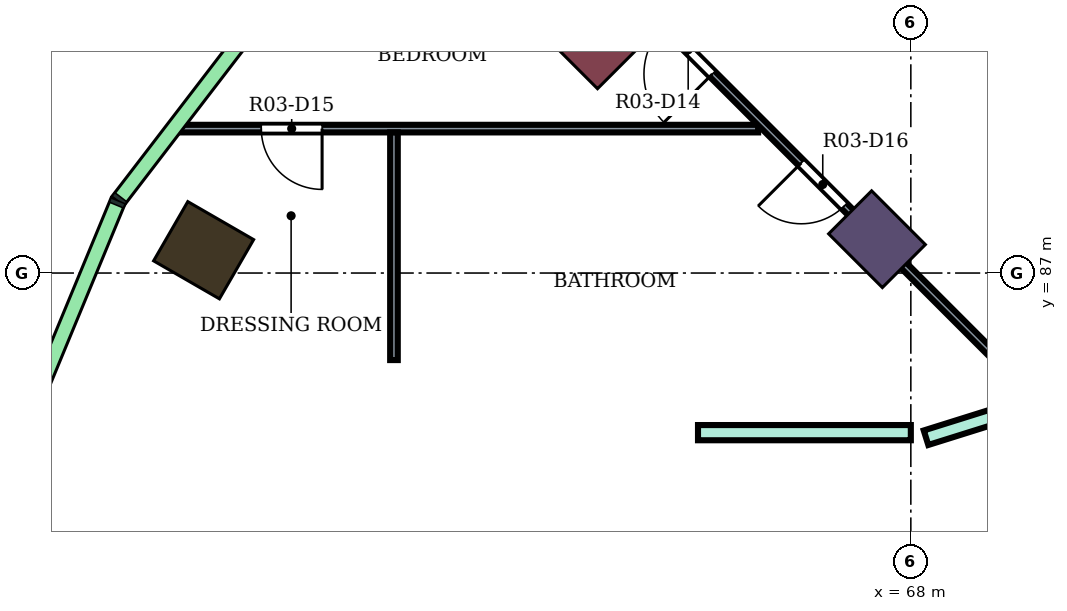
"""IFC4 building model, lengths in metres.
Left out: names, types, materials, properties, quantities, classifications, styles, units other than length and angle.
Written with IfcOpenShell. Run it as: python <this file> out.ifc"""

import sys

from ifc_helpers import new_model, si_unit, direction, frame, frame_2d, origin, origin_2d, place, context, subcontext, project, spatial, rectangle, extrude, element, fill, save


model = new_model("IFC4")
c1 = context("Model", 3, precision=1e-05, world=origin(), true_north=direction((0.0, 1.0)))
c2 = subcontext(c1, "Body", "Model", "MODEL_VIEW")
j1 = project(units=[si_unit("LENGTHUNIT", "METRE"), si_unit("PLANEANGLEUNIT", "RADIAN")], contexts=[c1])
p1 = place(None, origin())
s1 = spatial("IfcSite", under=j1, at=p1, CompositionType="ELEMENT")
p2 = place(p1, origin())
s2 = spatial("IfcBuilding", under=s1, at=p2, CompositionType="ELEMENT")
p3 = place(p2, frame((0.0, 0.0, 182.3)))
s3 = spatial("IfcBuildingStorey", under=s2, at=p3, CompositionType="ELEMENT", Elevation=182.3)
p4 = place(p3, frame((58.696, 87.3, 0.0), z_axis=(0.0, 0.0, 1.0), x_axis=(-0.866025403784, 0.5, 0.0)))
e1 = element("IfcColumn", 1, at=p4, inside=s3, PredefinedType="COLUMN", context=c2, shape_type="SweptSolid", body=[
    extrude(rectangle(XDim=1.0, YDim=0.9, at=origin_2d()), origin(), (0.0, 0.0, 1.0), 4.1),
])
p5 = place(p3, frame((67.555, 87.445, 0.0), z_axis=(0.0, 0.0, 1.0), x_axis=(-0.707106781187, 0.707106781187, 0.0)))
e2 = element("IfcColumn", 2, at=p5, inside=s3, PredefinedType="COLUMN", context=c2, shape_type="SweptSolid", body=[
    extrude(rectangle(XDim=1.0, YDim=0.8, at=origin_2d()), origin(), (0.0, 0.0, 1.0), 4.1),
])
p6 = place(p3, frame((64.09, 90.91, 0.0), z_axis=(0.0, 0.0, 1.0), x_axis=(-0.707106781187, 0.707106781187, 0.0)))
e3 = element("IfcColumn", 3, at=p6, inside=s3, PredefinedType="COLUMN", context=c2, shape_type="SweptSolid", body=[
    extrude(rectangle(XDim=1.8, YDim=2.4, at=origin_2d()), origin(), (0.0, 0.0, 1.0), 4.1),
])
p7 = place(p3, frame((65.2, 84.9, 0.0), z_axis=(0.0, 0.0, 1.0), x_axis=(1.0, 0.0, 0.0)))
e4 = element("IfcWall", 4, at=p7, inside=s3, PredefinedType="PARTITIONING", context=c2, shape_type="SweptSolid", body=[
    extrude(rectangle(XDim=2.8, YDim=0.2, at=frame_2d((1.4, 0.0))), origin(), (0.0, 0.0, 1.0), 3.65),
])
p8 = place(p3, frame((67.102, 97.342, 0.0), z_axis=(0.0, 0.0, 1.0), x_axis=(0.499940938316, -0.866059500378, 0.0)))
e5 = element("IfcWall", 5, at=p8, inside=s3, PredefinedType="PARTITIONING", context=c2, shape_type="SweptSolid", body=[
    extrude(rectangle(XDim=12.446, YDim=0.2, at=frame_2d((6.223, 0.0))), origin(), (0.0, 0.0, 1.0), 3.65),
])
p9 = place(p3, frame((68.2, 84.833, 0.0), z_axis=(0.0, 0.0, 1.0), x_axis=(0.954204109499, 0.299156342762, 0.0)))
e6 = element("IfcWall", 6, at=p9, inside=s3, PredefinedType="PARTITIONING", context=c2, shape_type="SweptSolid", body=[
    extrude(rectangle(XDim=5.74, YDim=0.2, at=frame_2d((2.87, 0.0))), origin(), (0.0, 0.0, 1.0), 3.65),
])
p10 = place(p9, frame((3.903, 0.0, 0.0)))
e7 = element("IfcOpeningElement", 7, at=p10, cuts=e6, PredefinedType="OPENING", context=c2, shape_type="SweptSolid", body=[
    extrude(rectangle(XDim=1.0, YDim=2.1, at=frame_2d((0.5, 1.05))), frame((0.0, 0.11, 0.0), z_axis=(0.0, -1.0, 0.0), x_axis=(1.0, 0.0, 0.0)), (0.0, 0.0, 1.0), 0.22),
])
p11 = place(p3, frame((58.379, 88.9, 0.0), z_axis=(0.0, 0.0, 1.0), x_axis=(1.0, 0.0, 0.0)))
e8 = element("IfcWall", 8, at=p11, inside=s3, PredefinedType="PARTITIONING", context=c2, shape_type="SweptSolid", body=[
    extrude(rectangle(XDim=7.612, YDim=0.1, at=frame_2d((3.806, 0.0))), origin(), (0.0, 0.0, 1.0), 3.65),
])
p12 = place(p11, frame((1.075, 0.0, 0.0)))
e9 = element("IfcOpeningElement", 9, at=p12, cuts=e8, PredefinedType="OPENING", context=c2, shape_type="SweptSolid", body=[
    extrude(rectangle(XDim=0.8, YDim=2.1, at=frame_2d((0.4, 1.05))), frame((0.0, 0.06, 0.0), z_axis=(0.0, -1.0, 0.0), x_axis=(1.0, 0.0, 0.0)), (0.0, 0.0, 1.0), 0.12),
])
p13 = place(p3, frame((61.2, 85.855, 0.0), z_axis=(0.0, 0.0, 1.0), x_axis=(0.0, 1.0, 0.0)))
e10 = element("IfcWall", 10, at=p13, inside=s3, PredefinedType="PARTITIONING", context=c2, shape_type="SweptSolid", body=[
    extrude(rectangle(XDim=2.995, YDim=0.1, at=frame_2d((1.498, 0.0))), origin(), (0.0, 0.0, 1.0), 3.65),
])
p14 = place(p3, frame((63.599, 91.409, 0.0), z_axis=(0.0, 0.0, 1.0), x_axis=(0.706920044618, -0.707293468453, 0.0)))
e11 = element("IfcWall", 11, at=p14, inside=s3, PredefinedType="PARTITIONING", context=c2, shape_type="SweptSolid", body=[
    extrude(rectangle(XDim=8.499, YDim=0.1, at=frame_2d((4.25, 0.0))), origin(), (0.0, 0.0, 1.0), 3.65),
])
p15 = place(p14, frame((1.632, 0.0, 0.0)))
e12 = element("IfcOpeningElement", 12, at=p15, cuts=e11, PredefinedType="OPENING", context=c2, shape_type="SweptSolid", body=[
    extrude(rectangle(XDim=0.9, YDim=2.1, at=frame_2d((0.45, 1.05))), frame((0.0, 0.06, 0.0), z_axis=(0.0, -1.0, 0.0), x_axis=(1.0, 0.0, 0.0)), (0.0, 0.0, 1.0), 0.12),
])
p16 = place(p14, frame((4.186, 0.0, 0.0)))
e13 = element("IfcOpeningElement", 13, at=p16, cuts=e11, PredefinedType="OPENING", context=c2, shape_type="SweptSolid", body=[
    extrude(rectangle(XDim=0.8, YDim=2.1, at=frame_2d((0.4, 1.05))), frame((0.0, 0.06, 0.0), z_axis=(0.0, -1.0, 0.0), x_axis=(1.0, 0.0, 0.0)), (0.0, 0.0, 1.0), 0.12),
])
p17 = place(p15, frame((0.9, 0.0, 0.0), z_axis=(0.0, 0.0, 1.0), x_axis=(-1.0, 0.0, 0.0)))
e14 = element("IfcDoor", 14, at=p17, inside=s3, OperationType="SINGLE_SWING_LEFT", PredefinedType="DOOR", context=c2, shape_type="SweptSolid", body=[
    extrude(rectangle(XDim=0.9, YDim=2.1, at=frame_2d((0.45, 1.05))), frame((0.0, 0.025, 0.0), z_axis=(0.0, -1.0, 0.0), x_axis=(1.0, 0.0, 0.0)), (0.0, 0.0, 1.0), 0.05),
])
fill(e12, e14)
p18 = place(p12, frame((0.8, 0.0, 0.0), z_axis=(0.0, 0.0, 1.0), x_axis=(-1.0, 0.0, 0.0)))
e15 = element("IfcDoor", 15, at=p18, inside=s3, OperationType="SINGLE_SWING_LEFT", PredefinedType="DOOR", context=c2, shape_type="SweptSolid", body=[
    extrude(rectangle(XDim=0.8, YDim=2.1, at=frame_2d((0.4, 1.05))), frame((0.0, 0.025, 0.0), z_axis=(0.0, -1.0, 0.0), x_axis=(1.0, 0.0, 0.0)), (0.0, 0.0, 1.0), 0.05),
])
fill(e9, e15)
p19 = place(p16, frame((0.8, 0.0, 0.0), z_axis=(0.0, 0.0, 1.0), x_axis=(-1.0, 0.0, 0.0)))
e16 = element("IfcDoor", 16, at=p19, inside=s3, OperationType="SINGLE_SWING_RIGHT", PredefinedType="DOOR", context=c2, shape_type="SweptSolid", body=[
    extrude(rectangle(XDim=0.8, YDim=2.1, at=frame_2d((0.4, 1.05))), frame((0.0, 0.025, 0.0), z_axis=(0.0, -1.0, 0.0), x_axis=(1.0, 0.0, 0.0)), (0.0, 0.0, 1.0), 0.05),
])
fill(e13, e16)
save(model, sys.argv[1])
